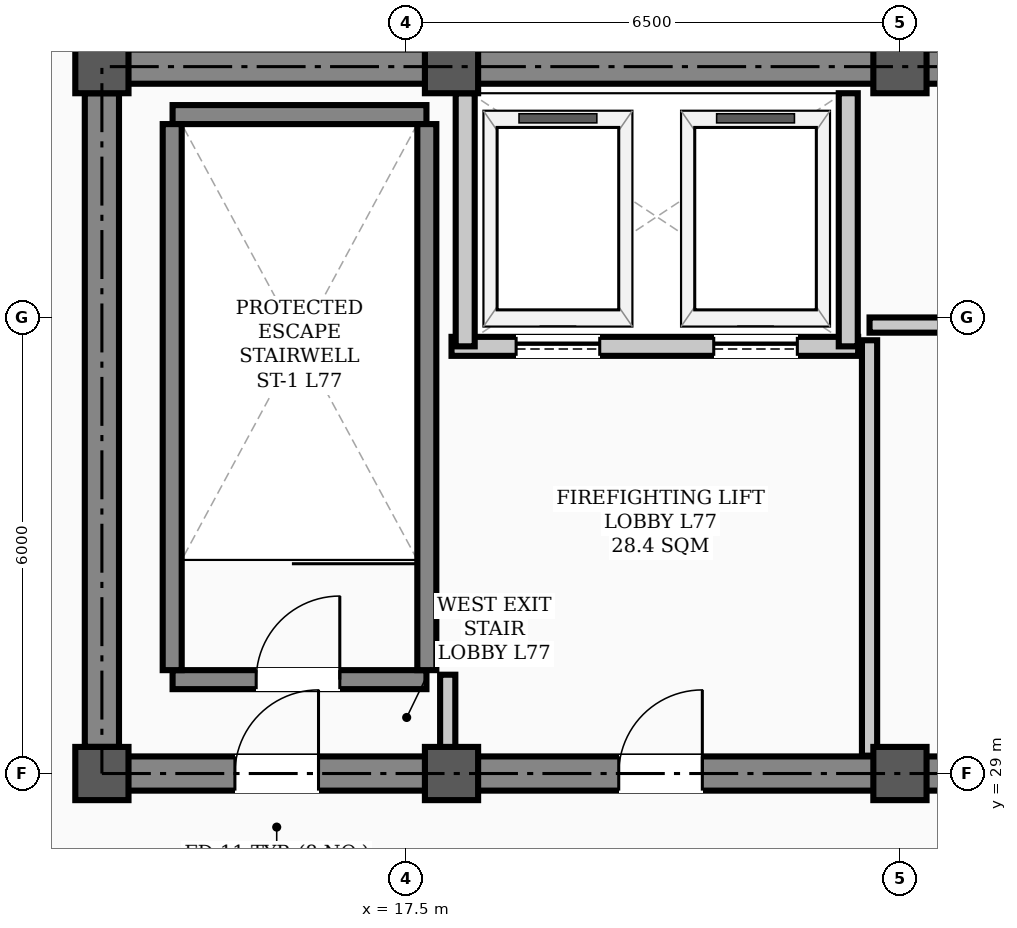
"""IFC4 building model, lengths in metres.
Left out: names, types, materials, properties, quantities, classifications, styles, units other than length and angle.
Written with IfcOpenShell. Run it as: python <this file> out.ifc"""

import sys

from ifc_helpers import new_model, si_unit, direction, frame, frame_2d, origin, origin_2d, place, context, subcontext, project, spatial, rectangle, hollow_rectangle, extrude, element, fill, save


model = new_model("IFC4")
c1 = context("Model", 3, precision=1e-05, world=origin(), true_north=direction((0.0, 1.0)))
c2 = subcontext(c1, "Body", "Model", "MODEL_VIEW")
j1 = project(units=[si_unit("LENGTHUNIT", "METRE"), si_unit("PLANEANGLEUNIT", "RADIAN")], contexts=[c1])
p1 = place(None, origin())
s1 = spatial("IfcSite", under=j1, at=p1, CompositionType="ELEMENT")
p2 = place(p1, origin())
s2 = spatial("IfcBuilding", under=s1, at=p2, CompositionType="ELEMENT")
p3 = place(p2, frame((0.0, 0.0, 312.6)))
s3 = spatial("IfcBuildingStorey", under=s2, at=p3, CompositionType="ELEMENT", Elevation=312.6)
for number, where, z_axis, x_axis in (
    (1, (13.5, 29.0, 0.0), (0.0, 0.0, 1.0), (1.0, 0.0, 0.0)),
    (2, (13.5, 38.3, 0.0), (0.0, 0.0, 1.0), (1.0, 0.0, 0.0)),
    (3, (18.1, 29.0, 0.0), (0.0, 0.0, 1.0), (1.0, 0.0, 0.0)),
    (4, (18.1, 38.3, 0.0), (0.0, 0.0, 1.0), (1.0, 0.0, 0.0)),
    (5, (24.0, 29.0, 0.0), (0.0, 0.0, 1.0), (1.0, 0.0, 0.0)),
    (6, (24.0, 38.3, 0.0), (0.0, 0.0, 1.0), (1.0, 0.0, 0.0)),
):
    element("IfcColumn", number, at=place(p3, frame(where, z_axis=z_axis, x_axis=x_axis)), inside=s3, PredefinedType="COLUMN", context=c2, shape_type="SweptSolid", body=[
        extrude(hollow_rectangle(XDim=0.7, YDim=0.7, WallThickness=0.028, InnerFilletRadius=0.014, OuterFilletRadius=0.042, at=origin_2d()), origin(), (0.0, 0.0, 1.0), 4.8),
    ])
p4 = place(p3, frame((13.5, 29.0, 0.0), z_axis=(0.0, 0.0, 1.0), x_axis=(1.0, 0.0, 0.0)))
e7 = element("IfcWall", 7, at=p4, inside=s3, PredefinedType="SHEAR", context=c2, shape_type="SweptSolid", body=[
    extrude(rectangle(XDim=30.5, YDim=0.45, at=frame_2d((15.25, 0.0))), origin(), (0.0, 0.0, 1.0), 4.45),
])
p5 = place(p4, frame((1.75, 0.0, 0.0)))
e8 = element("IfcOpeningElement", 8, at=p5, cuts=e7, PredefinedType="OPENING", context=c2, shape_type="SweptSolid", body=[
    extrude(rectangle(XDim=1.1, YDim=2.08, at=frame_2d((0.55, 1.04))), frame((0.0, 0.235, 0.0), z_axis=(0.0, -1.0, 0.0), x_axis=(1.0, 0.0, 0.0)), (0.0, 0.0, 1.0), 0.47),
])
p6 = place(p4, frame((26.7, 0.0, 0.0)))
e9 = element("IfcOpeningElement", 9, at=p6, cuts=e7, PredefinedType="OPENING", context=c2, shape_type="SweptSolid", body=[
    extrude(rectangle(XDim=1.1, YDim=2.08, at=frame_2d((0.55, 1.04))), frame((0.0, 0.235, 0.0), z_axis=(0.0, -1.0, 0.0), x_axis=(1.0, 0.0, 0.0)), (0.0, 0.0, 1.0), 0.47),
])
p7 = place(p4, frame((6.8, 0.0, 0.0)))
e10 = element("IfcOpeningElement", 10, at=p7, cuts=e7, PredefinedType="OPENING", context=c2, shape_type="SweptSolid", body=[
    extrude(rectangle(XDim=1.1, YDim=2.08, at=frame_2d((0.55, 1.04))), frame((0.0, 0.235, 0.0), z_axis=(0.0, -1.0, 0.0), x_axis=(1.0, 0.0, 0.0)), (0.0, 0.0, 1.0), 0.47),
])
p8 = place(p4, frame((13.2, 0.0, 0.0)))
e11 = element("IfcOpeningElement", 11, at=p8, cuts=e7, PredefinedType="OPENING", context=c2, shape_type="SweptSolid", body=[
    extrude(rectangle(XDim=1.6, YDim=2.08, at=frame_2d((0.8, 1.04))), frame((0.0, 0.235, 0.0), z_axis=(0.0, -1.0, 0.0), x_axis=(1.0, 0.0, 0.0)), (0.0, 0.0, 1.0), 0.47),
])
p9 = place(p4, frame((19.5, 0.0, 0.0)))
e12 = element("IfcOpeningElement", 12, at=p9, cuts=e7, PredefinedType="OPENING", context=c2, shape_type="SweptSolid", body=[
    extrude(rectangle(XDim=0.9, YDim=2.08, at=frame_2d((0.45, 1.04))), frame((0.0, 0.235, 0.0), z_axis=(0.0, -1.0, 0.0), x_axis=(1.0, 0.0, 0.0)), (0.0, 0.0, 1.0), 0.47),
])
p10 = place(p4, frame((21.55, 0.0, 0.0)))
e13 = element("IfcOpeningElement", 13, at=p10, cuts=e7, PredefinedType="OPENING", context=c2, shape_type="SweptSolid", body=[
    extrude(rectangle(XDim=0.9, YDim=2.08, at=frame_2d((0.45, 1.04))), frame((0.0, 0.235, 0.0), z_axis=(0.0, -1.0, 0.0), x_axis=(1.0, 0.0, 0.0)), (0.0, 0.0, 1.0), 0.47),
])
p11 = place(p3, frame((13.5, 38.3, 0.0), z_axis=(0.0, 0.0, 1.0), x_axis=(1.0, 0.0, 0.0)))
e14 = element("IfcWall", 14, at=p11, inside=s3, PredefinedType="SHEAR", context=c2, shape_type="SweptSolid", body=[
    extrude(rectangle(XDim=30.5, YDim=0.45, at=frame_2d((15.25, 0.0))), origin(), (0.0, 0.0, 1.0), 4.45),
])
p12 = place(p3, frame((13.5, 29.35, 0.0), z_axis=(0.0, 0.0, 1.0), x_axis=(0.0, 1.0, 0.0)))
e15 = element("IfcWall", 15, at=p12, inside=s3, PredefinedType="SHEAR", context=c2, shape_type="SweptSolid", body=[
    extrude(rectangle(XDim=8.6, YDim=0.45, at=frame_2d((4.3, 0.0))), origin(), (0.0, 0.0, 1.0), 4.45),
])
p13 = place(p3, frame((14.43, 30.235, 0.0), z_axis=(0.0, 0.0, 1.0), x_axis=(1.0, 0.0, 0.0)))
e16 = element("IfcWall", 16, at=p13, inside=s3, PredefinedType="STANDARD", context=c2, shape_type="SweptSolid", body=[
    extrude(rectangle(XDim=3.34, YDim=0.25, at=frame_2d((1.67, 0.0))), origin(), (0.0, 0.0, 1.0), 4.45),
])
p14 = place(p13, frame((1.1, 0.0, 0.0)))
e17 = element("IfcOpeningElement", 17, at=p14, cuts=e16, PredefinedType="OPENING", context=c2, shape_type="SweptSolid", body=[
    extrude(rectangle(XDim=1.1, YDim=2.08, at=frame_2d((0.55, 1.04))), frame((0.0, 0.135, 0.0), z_axis=(0.0, -1.0, 0.0), x_axis=(1.0, 0.0, 0.0)), (0.0, 0.0, 1.0), 0.27),
])
p15 = place(p3, frame((14.43, 37.669, 0.0), z_axis=(0.0, 0.0, 1.0), x_axis=(1.0, 0.0, 0.0)))
e18 = element("IfcWall", 18, at=p15, inside=s3, PredefinedType="STANDARD", context=c2, shape_type="SweptSolid", body=[
    extrude(rectangle(XDim=3.34, YDim=0.25, at=frame_2d((1.67, 0.0))), origin(), (0.0, 0.0, 1.0), 4.45),
])
for number, where, z_axis, x_axis in (
    (19, (14.425, 30.36, 0.0), (0.0, 0.0, 1.0), (0.0, 1.0, 0.0)),
    (20, (17.775, 30.36, 0.0), (0.0, 0.0, 1.0), (0.0, 1.0, 0.0)),
):
    element("IfcWall", number, at=place(p3, frame(where, z_axis=z_axis, x_axis=x_axis)), inside=s3, PredefinedType="STANDARD", context=c2, shape_type="SweptSolid", body=[
        extrude(rectangle(XDim=7.184, YDim=0.25, at=frame_2d((3.592, 0.0))), origin(), (0.0, 0.0, 1.0), 4.45),
    ])
p16 = place(p3, frame((18.1, 34.62, 0.0), z_axis=(0.0, 0.0, 1.0), x_axis=(1.0, 0.0, 0.0)))
e21 = element("IfcWall", 21, at=p16, inside=s3, PredefinedType="STANDARD", context=c2, shape_type="SweptSolid", body=[
    extrude(rectangle(XDim=5.35, YDim=0.25, at=frame_2d((2.675, 0.0))), origin(), (0.0, 0.0, 1.0), 4.45),
])
p17 = place(p16, frame((0.85, 0.0, 0.0)))
e22 = element("IfcOpeningElement", 22, at=p17, cuts=e21, PredefinedType="OPENING", context=c2, shape_type="SweptSolid", body=[
    extrude(rectangle(XDim=1.1, YDim=2.08, at=frame_2d((0.55, 1.04))), frame((0.0, 0.135, 0.0), z_axis=(0.0, -1.0, 0.0), x_axis=(1.0, 0.0, 0.0)), (0.0, 0.0, 1.0), 0.27),
])
p18 = place(p16, frame((3.45, 0.0, 0.0)))
e23 = element("IfcOpeningElement", 23, at=p18, cuts=e21, PredefinedType="OPENING", context=c2, shape_type="SweptSolid", body=[
    extrude(rectangle(XDim=1.1, YDim=2.08, at=frame_2d((0.55, 1.04))), frame((0.0, 0.135, 0.0), z_axis=(0.0, -1.0, 0.0), x_axis=(1.0, 0.0, 0.0)), (0.0, 0.0, 1.0), 0.27),
])
for number, where, z_axis, x_axis in (
    (24, (18.28, 34.62, 0.0), (0.0, 0.0, 1.0), (0.0, 1.0, 0.0)),
    (25, (23.32, 34.62, 0.0), (0.0, 0.0, 1.0), (0.0, 1.0, 0.0)),
):
    element("IfcWall", number, at=place(p3, frame(where, z_axis=z_axis, x_axis=x_axis)), inside=s3, PredefinedType="STANDARD", context=c2, shape_type="SweptSolid", body=[
        extrude(rectangle(XDim=3.33, YDim=0.25, at=frame_2d((1.665, 0.0))), origin(), (0.0, 0.0, 1.0), 4.45),
    ])
p19 = place(p3, frame((23.6, 34.9, 0.0), z_axis=(0.0, 0.0, 1.0), x_axis=(1.0, 0.0, 0.0)))
e26 = element("IfcWall", 26, at=p19, inside=s3, PredefinedType="STANDARD", context=c2, shape_type="SweptSolid", body=[
    extrude(rectangle(XDim=8.18, YDim=0.2, at=frame_2d((4.09, 0.0))), origin(), (0.0, 0.0, 1.0), 4.45),
])
p20 = place(p19, frame((3.45, 0.0, 0.0)))
e27 = element("IfcOpeningElement", 27, at=p20, cuts=e26, PredefinedType="OPENING", context=c2, shape_type="SweptSolid", body=[
    extrude(rectangle(XDim=1.1, YDim=2.08, at=frame_2d((0.55, 1.04))), frame((0.0, 0.11, 0.0), z_axis=(0.0, -1.0, 0.0), x_axis=(1.0, 0.0, 0.0)), (0.0, 0.0, 1.0), 0.22),
])
p21 = place(p3, frame((18.05, 29.235, 0.0), z_axis=(0.0, 0.0, 1.0), x_axis=(0.0, 1.0, 0.0)))
e28 = element("IfcWall", 28, at=p21, inside=s3, PredefinedType="STANDARD", context=c2, shape_type="SweptSolid", body=[
    extrude(rectangle(XDim=1.065, YDim=0.2, at=frame_2d((0.532, 0.0))), origin(), (0.0, 0.0, 1.0), 4.45),
])
p22 = place(p3, frame((23.6, 29.235, 0.0), z_axis=(0.0, 0.0, 1.0), x_axis=(0.0, 1.0, 0.0)))
e29 = element("IfcWall", 29, at=p22, inside=s3, PredefinedType="STANDARD", context=c2, shape_type="SweptSolid", body=[
    extrude(rectangle(XDim=5.465, YDim=0.2, at=frame_2d((2.732, 0.0))), origin(), (0.0, 0.0, 1.0), 4.396),
])
p23 = place(p14, origin())
e30 = element("IfcDoor", 30, at=p23, inside=s3, OperationType="SINGLE_SWING_RIGHT", PredefinedType="DOOR", context=c2, shape_type="SweptSolid", body=[
    extrude(rectangle(XDim=1.1, YDim=2.08, at=frame_2d((0.55, 1.04))), frame((0.0, 0.025, 0.0), z_axis=(0.0, -1.0, 0.0), x_axis=(1.0, 0.0, 0.0)), (0.0, 0.0, 1.0), 0.05),
])
fill(e17, e30)
p24 = place(p5, origin())
e31 = element("IfcDoor", 31, at=p24, inside=s3, OperationType="SINGLE_SWING_RIGHT", PredefinedType="DOOR", context=c2, shape_type="SweptSolid", body=[
    extrude(rectangle(XDim=1.1, YDim=2.08, at=frame_2d((0.55, 1.04))), frame((0.0, 0.025, 0.0), z_axis=(0.0, -1.0, 0.0), x_axis=(1.0, 0.0, 0.0)), (0.0, 0.0, 1.0), 0.05),
])
fill(e8, e31)
p25 = place(p7, origin())
e32 = element("IfcDoor", 32, at=p25, inside=s3, OperationType="SINGLE_SWING_RIGHT", PredefinedType="DOOR", context=c2, shape_type="SweptSolid", body=[
    extrude(rectangle(XDim=1.1, YDim=2.08, at=frame_2d((0.55, 1.04))), frame((0.0, 0.025, 0.0), z_axis=(0.0, -1.0, 0.0), x_axis=(1.0, 0.0, 0.0)), (0.0, 0.0, 1.0), 0.05),
])
fill(e10, e32)
p26 = place(p17, origin())
e33 = element("IfcDoor", 33, at=p26, inside=s3, OperationType="SLIDING_TO_LEFT", PredefinedType="DOOR", context=c2, shape_type="SweptSolid", body=[
    extrude(rectangle(XDim=1.1, YDim=2.08, at=frame_2d((0.55, 1.04))), frame((0.0, 0.025, 0.0), z_axis=(0.0, -1.0, 0.0), x_axis=(1.0, 0.0, 0.0)), (0.0, 0.0, 1.0), 0.05),
])
fill(e22, e33)
p27 = place(p18, origin())
e34 = element("IfcDoor", 34, at=p27, inside=s3, OperationType="SLIDING_TO_LEFT", PredefinedType="DOOR", context=c2, shape_type="SweptSolid", body=[
    extrude(rectangle(XDim=1.1, YDim=2.08, at=frame_2d((0.55, 1.04))), frame((0.0, 0.025, 0.0), z_axis=(0.0, -1.0, 0.0), x_axis=(1.0, 0.0, 0.0)), (0.0, 0.0, 1.0), 0.05),
])
fill(e23, e34)
save(model, sys.argv[1])
